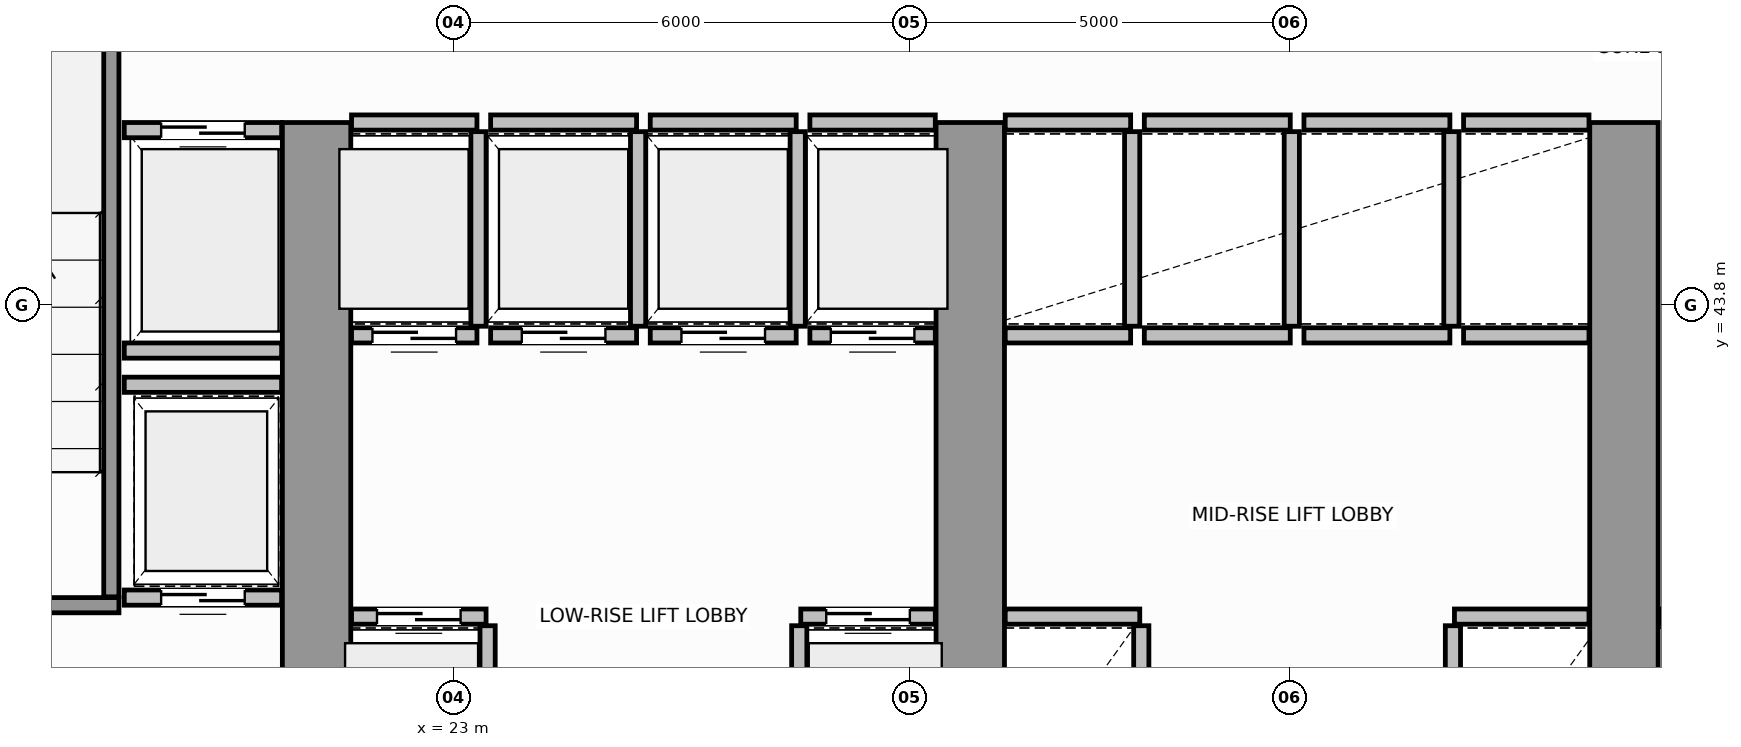
"""IFC4 building model, lengths in metres.
Left out: names, types, materials, properties, quantities, classifications, styles, units other than length and angle.
Written with IfcOpenShell. Run it as: python <this file> out.ifc"""

import sys

from ifc_helpers import new_model, si_unit, direction, frame, frame_2d, origin, place, context, subcontext, project, spatial, rectangle, extrude, source, transform, mapped, element, fill, save


model = new_model("IFC4")
c1 = context("Model", 3, precision=1e-05, world=origin(), true_north=direction((0.0, 1.0)))
c2 = subcontext(c1, "Body", "Model", "MODEL_VIEW")
j1 = project(units=[si_unit("LENGTHUNIT", "METRE"), si_unit("PLANEANGLEUNIT", "RADIAN")], contexts=[c1])
p1 = place(None, origin())
s1 = spatial("IfcSite", under=j1, at=p1, CompositionType="ELEMENT")
p2 = place(p1, origin())
s2 = spatial("IfcBuilding", under=s1, at=p2, CompositionType="ELEMENT")
p3 = place(p2, frame((0.0, 0.0, 26.4)))
s3 = spatial("IfcBuildingStorey", under=s2, at=p3, CompositionType="ELEMENT", Elevation=26.4)
for number, where, z_axis, x_axis in (
    (1, (21.2, 36.97, 0.0), (0.0, 0.0, 1.0), (0.0, 1.0, 0.0)),
    (2, (29.8, 36.97, 0.0), (0.0, 0.0, 1.0), (0.0, 1.0, 0.0)),
    (3, (38.4, 36.97, 0.0), (0.0, 0.0, 1.0), (0.0, 1.0, 0.0)),
):
    element("IfcWall", number, at=place(p3, frame(where, z_axis=z_axis, x_axis=x_axis)), inside=s3, PredefinedType="SHEAR", context=c2, shape_type="SweptSolid", body=[
        extrude(rectangle(XDim=9.23, YDim=0.9, at=frame_2d((4.615, 0.0))), origin(), (0.0, 0.0, 1.0), 3.8),
    ])
p4 = place(p3, frame((14.45, 39.85, 0.0), z_axis=(0.0, 0.0, 1.0), x_axis=(1.0, 0.0, 0.0)))
e4 = element("IfcWall", 4, at=p4, inside=s3, PredefinedType="SOLIDWALL", context=c2, shape_type="SweptSolid", body=[
    extrude(rectangle(XDim=4.15, YDim=0.2, at=frame_2d((2.075, 0.0))), origin(), (0.0, 0.0, 1.0), 3.8),
])
p5 = place(p4, frame((1.725, 0.0, 0.0)))
e5 = element("IfcOpeningElement", 5, at=p5, cuts=e4, PredefinedType="OPENING", context=c2, shape_type="SweptSolid", body=[
    extrude(rectangle(XDim=1.1, YDim=2.15, at=frame_2d((0.55, 1.075))), frame((0.0, 0.11, 0.0), z_axis=(0.0, -1.0, 0.0), x_axis=(1.0, 0.0, 0.0)), (0.0, 0.0, 1.0), 0.22),
])
p6 = place(p3, frame((18.5, 39.96, 0.0), z_axis=(0.0, 0.0, 1.0), x_axis=(0.0, 1.0, 0.0)))
e6 = element("IfcWall", 6, at=p6, inside=s3, PredefinedType="SOLIDWALL", context=c2, shape_type="SweptSolid", body=[
    extrude(rectangle(XDim=9.93, YDim=0.2, at=frame_2d((4.965, 0.0))), origin(), (0.0, 0.0, 1.0), 3.8),
])
p7 = place(p3, frame((21.66, 39.7, 0.0), z_axis=(0.0, 0.0, 1.0), x_axis=(1.0, 0.0, 0.0)))
e7 = element("IfcWall", 7, at=p7, inside=s3, PredefinedType="SOLIDWALL", context=c2, shape_type="SweptSolid", body=[
    extrude(rectangle(XDim=1.77, YDim=0.2, at=frame_2d((0.885, 0.0))), origin(), (0.0, 0.0, 1.0), 3.58),
])
p8 = place(p7, frame((0.335, 0.0, 0.0)))
e8 = element("IfcOpeningElement", 8, at=p8, cuts=e7, PredefinedType="OPENING", context=c2, shape_type="SweptSolid", body=[
    extrude(rectangle(XDim=1.1, YDim=2.15, at=frame_2d((0.55, 1.075))), frame((0.0, 0.11, 0.0), z_axis=(0.0, -1.0, 0.0), x_axis=(1.0, 0.0, 0.0)), (0.0, 0.0, 1.0), 0.22),
])
p9 = place(p3, frame((23.45, 37.02, 0.0), z_axis=(0.0, 0.0, 1.0), x_axis=(0.0, 1.0, 0.0)))
e9 = element("IfcWall", 9, at=p9, inside=s3, PredefinedType="SOLIDWALL", context=c2, shape_type="SweptSolid", body=[
    extrude(rectangle(XDim=2.56, YDim=0.2, at=frame_2d((1.28, 0.0))), origin(), (0.0, 0.0, 1.0), 3.58),
])
p10 = place(p3, frame((27.57, 39.7, 0.0), z_axis=(0.0, 0.0, 1.0), x_axis=(1.0, 0.0, 0.0)))
e10 = element("IfcWall", 10, at=p10, inside=s3, PredefinedType="SOLIDWALL", context=c2, shape_type="SweptSolid", body=[
    extrude(rectangle(XDim=1.77, YDim=0.2, at=frame_2d((0.885, 0.0))), origin(), (0.0, 0.0, 1.0), 3.58),
])
p11 = place(p10, frame((0.335, 0.0, 0.0)))
e11 = element("IfcOpeningElement", 11, at=p11, cuts=e10, PredefinedType="OPENING", context=c2, shape_type="SweptSolid", body=[
    extrude(rectangle(XDim=1.1, YDim=2.15, at=frame_2d((0.55, 1.075))), frame((0.0, 0.11, 0.0), z_axis=(0.0, -1.0, 0.0), x_axis=(1.0, 0.0, 0.0)), (0.0, 0.0, 1.0), 0.22),
])
p12 = place(p3, frame((27.55, 37.02, 0.0), z_axis=(0.0, 0.0, 1.0), x_axis=(0.0, 1.0, 0.0)))
e12 = element("IfcWall", 12, at=p12, inside=s3, PredefinedType="SOLIDWALL", context=c2, shape_type="SweptSolid", body=[
    extrude(rectangle(XDim=2.56, YDim=0.2, at=frame_2d((1.28, 0.0))), origin(), (0.0, 0.0, 1.0), 3.58),
])
p13 = place(p3, frame((21.66, 43.4, 0.0), z_axis=(0.0, 0.0, 1.0), x_axis=(1.0, 0.0, 0.0)))
e13 = element("IfcWall", 13, at=p13, inside=s3, PredefinedType="SOLIDWALL", context=c2, shape_type="SweptSolid", body=[
    extrude(rectangle(XDim=1.65, YDim=0.2, at=frame_2d((0.825, 0.0))), origin(), (0.0, 0.0, 1.0), 3.58),
])
p14 = place(p13, frame((0.275, 0.0, 0.0)))
e14 = element("IfcOpeningElement", 14, at=p14, cuts=e13, PredefinedType="OPENING", context=c2, shape_type="SweptSolid", body=[
    extrude(rectangle(XDim=1.1, YDim=2.15, at=frame_2d((0.55, 1.075))), frame((0.0, 0.11, 0.0), z_axis=(0.0, -1.0, 0.0), x_axis=(1.0, 0.0, 0.0)), (0.0, 0.0, 1.0), 0.22),
])
p15 = place(p3, frame((21.66, 46.2, 0.0), z_axis=(0.0, 0.0, 1.0), x_axis=(1.0, 0.0, 0.0)))
e15 = element("IfcWall", 15, at=p15, inside=s3, PredefinedType="SOLIDWALL", context=c2, shape_type="SweptSolid", body=[
    extrude(rectangle(XDim=1.65, YDim=0.2, at=frame_2d((0.825, 0.0))), origin(), (0.0, 0.0, 1.0), 3.58),
])
p16 = place(p3, frame((23.33, 43.52, 0.0), z_axis=(0.0, 0.0, 1.0), x_axis=(0.0, 1.0, 0.0)))
e16 = element("IfcWall", 16, at=p16, inside=s3, PredefinedType="SOLIDWALL", context=c2, shape_type="SweptSolid", body=[
    extrude(rectangle(XDim=2.56, YDim=0.2, at=frame_2d((1.28, 0.0))), origin(), (0.0, 0.0, 1.0), 3.58),
])
p17 = place(p3, frame((23.49, 43.4, 0.0), z_axis=(0.0, 0.0, 1.0), x_axis=(1.0, 0.0, 0.0)))
e17 = element("IfcWall", 17, at=p17, inside=s3, PredefinedType="SOLIDWALL", context=c2, shape_type="SweptSolid", body=[
    extrude(rectangle(XDim=1.92, YDim=0.2, at=frame_2d((0.96, 0.0))), origin(), (0.0, 0.0, 1.0), 3.58),
])
p18 = place(p17, frame((0.41, 0.0, 0.0)))
e18 = element("IfcOpeningElement", 18, at=p18, cuts=e17, PredefinedType="OPENING", context=c2, shape_type="SweptSolid", body=[
    extrude(rectangle(XDim=1.1, YDim=2.15, at=frame_2d((0.55, 1.075))), frame((0.0, 0.11, 0.0), z_axis=(0.0, -1.0, 0.0), x_axis=(1.0, 0.0, 0.0)), (0.0, 0.0, 1.0), 0.22),
])
p19 = place(p3, frame((23.49, 46.2, 0.0), z_axis=(0.0, 0.0, 1.0), x_axis=(1.0, 0.0, 0.0)))
e19 = element("IfcWall", 19, at=p19, inside=s3, PredefinedType="SOLIDWALL", context=c2, shape_type="SweptSolid", body=[
    extrude(rectangle(XDim=1.92, YDim=0.2, at=frame_2d((0.96, 0.0))), origin(), (0.0, 0.0, 1.0), 3.58),
])
p20 = place(p3, frame((25.43, 43.52, 0.0), z_axis=(0.0, 0.0, 1.0), x_axis=(0.0, 1.0, 0.0)))
e20 = element("IfcWall", 20, at=p20, inside=s3, PredefinedType="SOLIDWALL", context=c2, shape_type="SweptSolid", body=[
    extrude(rectangle(XDim=2.56, YDim=0.2, at=frame_2d((1.28, 0.0))), origin(), (0.0, 0.0, 1.0), 3.58),
])
p21 = place(p3, frame((25.59, 43.4, 0.0), z_axis=(0.0, 0.0, 1.0), x_axis=(1.0, 0.0, 0.0)))
e21 = element("IfcWall", 21, at=p21, inside=s3, PredefinedType="SOLIDWALL", context=c2, shape_type="SweptSolid", body=[
    extrude(rectangle(XDim=1.92, YDim=0.2, at=frame_2d((0.96, 0.0))), origin(), (0.0, 0.0, 1.0), 3.58),
])
p22 = place(p21, frame((0.41, 0.0, 0.0)))
e22 = element("IfcOpeningElement", 22, at=p22, cuts=e21, PredefinedType="OPENING", context=c2, shape_type="SweptSolid", body=[
    extrude(rectangle(XDim=1.1, YDim=2.15, at=frame_2d((0.55, 1.075))), frame((0.0, 0.11, 0.0), z_axis=(0.0, -1.0, 0.0), x_axis=(1.0, 0.0, 0.0)), (0.0, 0.0, 1.0), 0.22),
])
p23 = place(p3, frame((25.59, 46.2, 0.0), z_axis=(0.0, 0.0, 1.0), x_axis=(1.0, 0.0, 0.0)))
e23 = element("IfcWall", 23, at=p23, inside=s3, PredefinedType="SOLIDWALL", context=c2, shape_type="SweptSolid", body=[
    extrude(rectangle(XDim=1.92, YDim=0.2, at=frame_2d((0.96, 0.0))), origin(), (0.0, 0.0, 1.0), 3.58),
])
p24 = place(p3, frame((27.53, 43.52, 0.0), z_axis=(0.0, 0.0, 1.0), x_axis=(0.0, 1.0, 0.0)))
e24 = element("IfcWall", 24, at=p24, inside=s3, PredefinedType="SOLIDWALL", context=c2, shape_type="SweptSolid", body=[
    extrude(rectangle(XDim=2.56, YDim=0.2, at=frame_2d((1.28, 0.0))), origin(), (0.0, 0.0, 1.0), 3.58),
])
p25 = place(p3, frame((27.69, 43.4, 0.0), z_axis=(0.0, 0.0, 1.0), x_axis=(1.0, 0.0, 0.0)))
e25 = element("IfcWall", 25, at=p25, inside=s3, PredefinedType="SOLIDWALL", context=c2, shape_type="SweptSolid", body=[
    extrude(rectangle(XDim=1.65, YDim=0.2, at=frame_2d((0.825, 0.0))), origin(), (0.0, 0.0, 1.0), 3.58),
])
p26 = place(p25, frame((0.275, 0.0, 0.0)))
e26 = element("IfcOpeningElement", 26, at=p26, cuts=e25, PredefinedType="OPENING", context=c2, shape_type="SweptSolid", body=[
    extrude(rectangle(XDim=1.1, YDim=2.15, at=frame_2d((0.55, 1.075))), frame((0.0, 0.11, 0.0), z_axis=(0.0, -1.0, 0.0), x_axis=(1.0, 0.0, 0.0)), (0.0, 0.0, 1.0), 0.22),
])
p27 = place(p3, frame((27.69, 46.2, 0.0), z_axis=(0.0, 0.0, 1.0), x_axis=(1.0, 0.0, 0.0)))
e27 = element("IfcWall", 27, at=p27, inside=s3, PredefinedType="SOLIDWALL", context=c2, shape_type="SweptSolid", body=[
    extrude(rectangle(XDim=1.65, YDim=0.2, at=frame_2d((0.825, 0.0))), origin(), (0.0, 0.0, 1.0), 3.58),
])
p28 = place(p3, frame((30.26, 39.7, 0.0), z_axis=(0.0, 0.0, 1.0), x_axis=(1.0, 0.0, 0.0)))
e28 = element("IfcWall", 28, at=p28, inside=s3, PredefinedType="SOLIDWALL", context=c2, shape_type="SweptSolid", body=[
    extrude(rectangle(XDim=1.77, YDim=0.2, at=frame_2d((0.885, 0.0))), origin(), (0.0, 0.0, 1.0), 3.58),
])
p29 = place(p3, frame((32.05, 37.02, 0.0), z_axis=(0.0, 0.0, 1.0), x_axis=(0.0, 1.0, 0.0)))
e29 = element("IfcWall", 29, at=p29, inside=s3, PredefinedType="SOLIDWALL", context=c2, shape_type="SweptSolid", body=[
    extrude(rectangle(XDim=2.56, YDim=0.2, at=frame_2d((1.28, 0.0))), origin(), (0.0, 0.0, 1.0), 3.58),
])
p30 = place(p3, frame((36.17, 39.7, 0.0), z_axis=(0.0, 0.0, 1.0), x_axis=(1.0, 0.0, 0.0)))
e30 = element("IfcWall", 30, at=p30, inside=s3, PredefinedType="SOLIDWALL", context=c2, shape_type="SweptSolid", body=[
    extrude(rectangle(XDim=1.77, YDim=0.2, at=frame_2d((0.885, 0.0))), origin(), (0.0, 0.0, 1.0), 3.58),
])
p31 = place(p3, frame((36.15, 37.02, 0.0), z_axis=(0.0, 0.0, 1.0), x_axis=(0.0, 1.0, 0.0)))
e31 = element("IfcWall", 31, at=p31, inside=s3, PredefinedType="SOLIDWALL", context=c2, shape_type="SweptSolid", body=[
    extrude(rectangle(XDim=2.56, YDim=0.2, at=frame_2d((1.28, 0.0))), origin(), (0.0, 0.0, 1.0), 3.58),
])
for number, where, z_axis, x_axis in (
    (32, (30.26, 43.4, 0.0), (0.0, 0.0, 1.0), (1.0, 0.0, 0.0)),
    (33, (30.26, 46.2, 0.0), (0.0, 0.0, 1.0), (1.0, 0.0, 0.0)),
):
    element("IfcWall", number, at=place(p3, frame(where, z_axis=z_axis, x_axis=x_axis)), inside=s3, PredefinedType="SOLIDWALL", context=c2, shape_type="SweptSolid", body=[
        extrude(rectangle(XDim=1.65, YDim=0.2, at=frame_2d((0.825, 0.0))), origin(), (0.0, 0.0, 1.0), 3.58),
    ])
p32 = place(p3, frame((31.93, 43.52, 0.0), z_axis=(0.0, 0.0, 1.0), x_axis=(0.0, 1.0, 0.0)))
e34 = element("IfcWall", 34, at=p32, inside=s3, PredefinedType="SOLIDWALL", context=c2, shape_type="SweptSolid", body=[
    extrude(rectangle(XDim=2.56, YDim=0.2, at=frame_2d((1.28, 0.0))), origin(), (0.0, 0.0, 1.0), 3.58),
])
for number, where, z_axis, x_axis in (
    (35, (32.09, 43.4, 0.0), (0.0, 0.0, 1.0), (1.0, 0.0, 0.0)),
    (36, (32.09, 46.2, 0.0), (0.0, 0.0, 1.0), (1.0, 0.0, 0.0)),
):
    element("IfcWall", number, at=place(p3, frame(where, z_axis=z_axis, x_axis=x_axis)), inside=s3, PredefinedType="SOLIDWALL", context=c2, shape_type="SweptSolid", body=[
        extrude(rectangle(XDim=1.92, YDim=0.2, at=frame_2d((0.96, 0.0))), origin(), (0.0, 0.0, 1.0), 3.58),
    ])
p33 = place(p3, frame((34.03, 43.52, 0.0), z_axis=(0.0, 0.0, 1.0), x_axis=(0.0, 1.0, 0.0)))
e37 = element("IfcWall", 37, at=p33, inside=s3, PredefinedType="SOLIDWALL", context=c2, shape_type="SweptSolid", body=[
    extrude(rectangle(XDim=2.56, YDim=0.2, at=frame_2d((1.28, 0.0))), origin(), (0.0, 0.0, 1.0), 3.58),
])
for number, where, z_axis, x_axis in (
    (38, (34.19, 43.4, 0.0), (0.0, 0.0, 1.0), (1.0, 0.0, 0.0)),
    (39, (34.19, 46.2, 0.0), (0.0, 0.0, 1.0), (1.0, 0.0, 0.0)),
):
    element("IfcWall", number, at=place(p3, frame(where, z_axis=z_axis, x_axis=x_axis)), inside=s3, PredefinedType="SOLIDWALL", context=c2, shape_type="SweptSolid", body=[
        extrude(rectangle(XDim=1.92, YDim=0.2, at=frame_2d((0.96, 0.0))), origin(), (0.0, 0.0, 1.0), 3.58),
    ])
p34 = place(p3, frame((36.13, 43.52, 0.0), z_axis=(0.0, 0.0, 1.0), x_axis=(0.0, 1.0, 0.0)))
e40 = element("IfcWall", 40, at=p34, inside=s3, PredefinedType="SOLIDWALL", context=c2, shape_type="SweptSolid", body=[
    extrude(rectangle(XDim=2.56, YDim=0.2, at=frame_2d((1.28, 0.0))), origin(), (0.0, 0.0, 1.0), 3.58),
])
for number, where, z_axis, x_axis in (
    (41, (36.29, 43.4, 0.0), (0.0, 0.0, 1.0), (1.0, 0.0, 0.0)),
    (42, (36.29, 46.2, 0.0), (0.0, 0.0, 1.0), (1.0, 0.0, 0.0)),
):
    element("IfcWall", number, at=place(p3, frame(where, z_axis=z_axis, x_axis=x_axis)), inside=s3, PredefinedType="SOLIDWALL", context=c2, shape_type="SweptSolid", body=[
        extrude(rectangle(XDim=1.65, YDim=0.2, at=frame_2d((0.825, 0.0))), origin(), (0.0, 0.0, 1.0), 3.58),
    ])
p35 = place(p3, frame((38.86, 39.7, 0.0), z_axis=(0.0, 0.0, 1.0), x_axis=(1.0, 0.0, 0.0)))
e43 = element("IfcWall", 43, at=p35, inside=s3, PredefinedType="SOLIDWALL", context=c2, shape_type="SweptSolid", body=[
    extrude(rectangle(XDim=1.77, YDim=0.2, at=frame_2d((0.885, 0.0))), origin(), (0.0, 0.0, 1.0), 3.58),
])
p36 = place(p3, frame((18.67, 46.1, 0.0), z_axis=(0.0, 0.0, 1.0), x_axis=(1.0, 0.0, 0.0)))
e44 = element("IfcWall", 44, at=p36, inside=s3, PredefinedType="SOLIDWALL", context=c2, shape_type="SweptSolid", body=[
    extrude(rectangle(XDim=2.07, YDim=0.2, at=frame_2d((1.035, 0.0))), origin(), (0.0, 0.0, 1.0), 3.58),
])
p37 = place(p36, frame((0.485, 0.0, 0.0)))
e45 = element("IfcOpeningElement", 45, at=p37, cuts=e44, PredefinedType="OPENING", context=c2, shape_type="SweptSolid", body=[
    extrude(rectangle(XDim=1.1, YDim=2.15, at=frame_2d((0.55, 1.075))), frame((0.0, 0.11, 0.0), z_axis=(0.0, -1.0, 0.0), x_axis=(1.0, 0.0, 0.0)), (0.0, 0.0, 1.0), 0.22),
])
p38 = place(p3, frame((18.67, 43.2, 0.0), z_axis=(0.0, 0.0, 1.0), x_axis=(1.0, 0.0, 0.0)))
e46 = element("IfcWall", 46, at=p38, inside=s3, PredefinedType="SOLIDWALL", context=c2, shape_type="SweptSolid", body=[
    extrude(rectangle(XDim=2.07, YDim=0.2, at=frame_2d((1.035, 0.0))), origin(), (0.0, 0.0, 1.0), 3.58),
])
p39 = place(p3, frame((18.67, 39.95, 0.0), z_axis=(0.0, 0.0, 1.0), x_axis=(1.0, 0.0, 0.0)))
e47 = element("IfcWall", 47, at=p39, inside=s3, PredefinedType="SOLIDWALL", context=c2, shape_type="SweptSolid", body=[
    extrude(rectangle(XDim=2.07, YDim=0.2, at=frame_2d((1.035, 0.0))), origin(), (0.0, 0.0, 1.0), 3.58),
])
p40 = place(p39, frame((0.485, 0.0, 0.0)))
e48 = element("IfcOpeningElement", 48, at=p40, cuts=e47, PredefinedType="OPENING", context=c2, shape_type="SweptSolid", body=[
    extrude(rectangle(XDim=1.1, YDim=2.15, at=frame_2d((0.55, 1.075))), frame((0.0, 0.11, 0.0), z_axis=(0.0, -1.0, 0.0), x_axis=(1.0, 0.0, 0.0)), (0.0, 0.0, 1.0), 0.22),
])
p41 = place(p3, frame((18.67, 42.75, 0.0), z_axis=(0.0, 0.0, 1.0), x_axis=(1.0, 0.0, 0.0)))
e49 = element("IfcWall", 49, at=p41, inside=s3, PredefinedType="SOLIDWALL", context=c2, shape_type="SweptSolid", body=[
    extrude(rectangle(XDim=2.07, YDim=0.2, at=frame_2d((1.035, 0.0))), origin(), (0.0, 0.0, 1.0), 3.58),
])
m1 = source(origin(), c2, "Body", "SweptSolid", [
    extrude(rectangle(XDim=1.1, YDim=2.15, at=frame_2d((0.55, 1.075))), frame((0.0, 0.025, 0.0), z_axis=(0.0, -1.0, 0.0), x_axis=(1.0, 0.0, 0.0)), (0.0, 0.0, 1.0), 0.05),
])
p42 = place(p8, origin())
e50 = element("IfcDoor", 50, at=p42, inside=s3, OperationType="DOUBLE_DOOR_SLIDING", PredefinedType="DOOR", context=c2, shape_type="MappedRepresentation", body=[
    mapped(m1, transform((0.0, 0.0, 0.0), scale=1.0)),
])
fill(e8, e50)
p43 = place(p11, origin())
e51 = element("IfcDoor", 51, at=p43, inside=s3, OperationType="DOUBLE_DOOR_SLIDING", PredefinedType="DOOR", context=c2, shape_type="MappedRepresentation", body=[
    mapped(m1, transform((0.0, 0.0, 0.0), scale=1.0)),
])
fill(e11, e51)
p44 = place(p14, origin())
e52 = element("IfcDoor", 52, at=p44, inside=s3, OperationType="DOUBLE_DOOR_SLIDING", PredefinedType="DOOR", context=c2, shape_type="MappedRepresentation", body=[
    mapped(m1, transform((0.0, 0.0, 0.0), scale=1.0)),
])
fill(e14, e52)
p45 = place(p18, origin())
e53 = element("IfcDoor", 53, at=p45, inside=s3, OperationType="DOUBLE_DOOR_SLIDING", PredefinedType="DOOR", context=c2, shape_type="MappedRepresentation", body=[
    mapped(m1, transform((0.0, 0.0, 0.0), scale=1.0)),
])
fill(e18, e53)
p46 = place(p22, origin())
e54 = element("IfcDoor", 54, at=p46, inside=s3, OperationType="DOUBLE_DOOR_SLIDING", PredefinedType="DOOR", context=c2, shape_type="MappedRepresentation", body=[
    mapped(m1, transform((0.0, 0.0, 0.0), scale=1.0)),
])
fill(e22, e54)
p47 = place(p26, origin())
e55 = element("IfcDoor", 55, at=p47, inside=s3, OperationType="DOUBLE_DOOR_SLIDING", PredefinedType="DOOR", context=c2, shape_type="MappedRepresentation", body=[
    mapped(m1, transform((0.0, 0.0, 0.0), scale=1.0)),
])
fill(e26, e55)
p48 = place(p37, origin())
e56 = element("IfcDoor", 56, at=p48, inside=s3, OperationType="DOUBLE_DOOR_SLIDING", PredefinedType="DOOR", context=c2, shape_type="MappedRepresentation", body=[
    mapped(m1, transform((0.0, 0.0, 0.0), scale=1.0)),
])
fill(e45, e56)
p49 = place(p40, origin())
e57 = element("IfcDoor", 57, at=p49, inside=s3, OperationType="DOUBLE_DOOR_SLIDING", PredefinedType="DOOR", context=c2, shape_type="MappedRepresentation", body=[
    mapped(m1, transform((0.0, 0.0, 0.0), scale=1.0)),
])
fill(e48, e57)
save(model, sys.argv[1])
